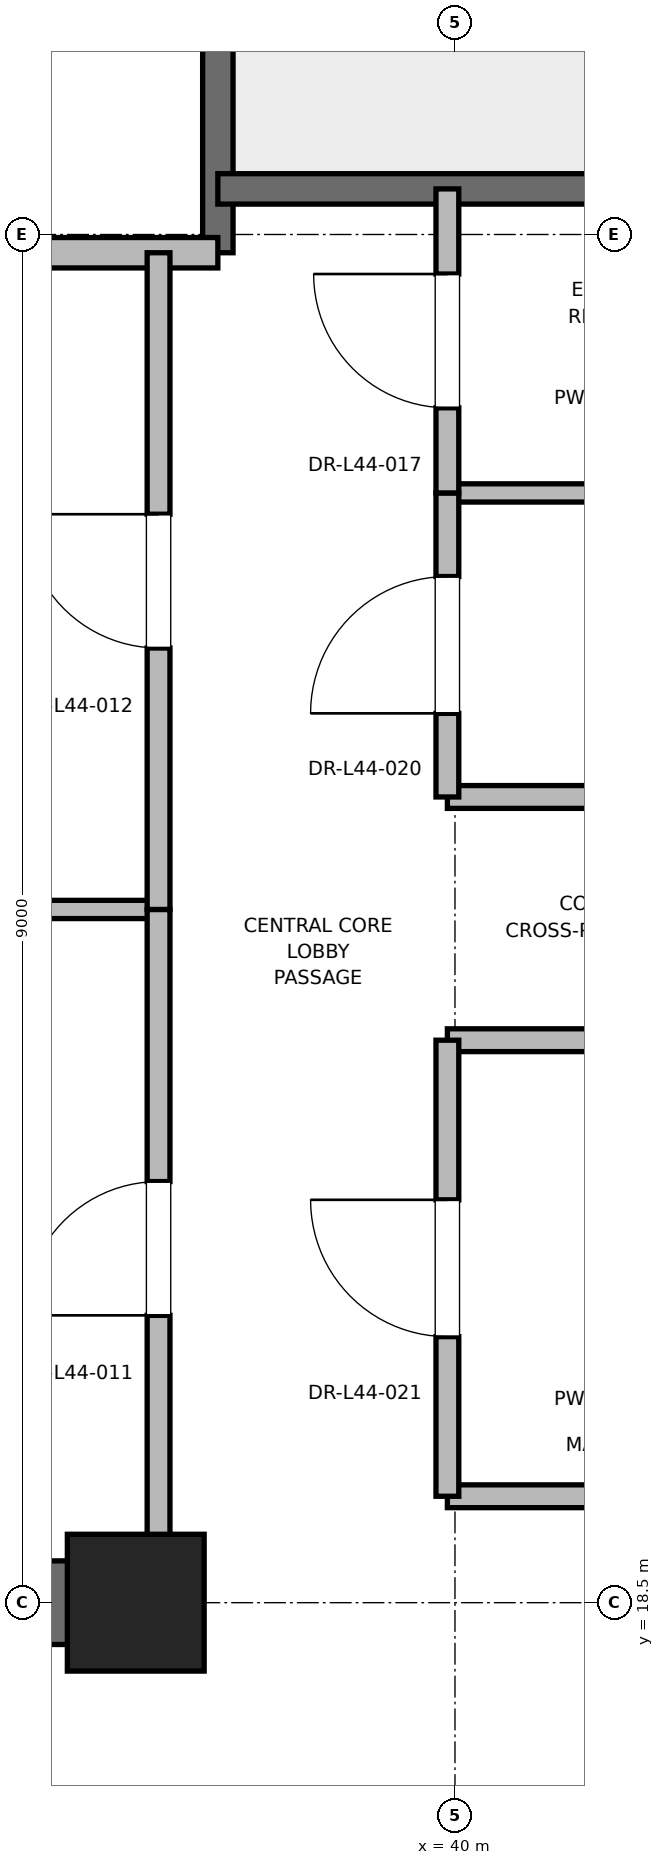
"""IFC4 building model, lengths in metres.
Left out: names, types, materials, properties, quantities, classifications, styles, units other than length and angle.
Written with IfcOpenShell. Run it as: python <this file> out.ifc"""

import sys

from ifc_helpers import new_model, si_unit, direction, frame, frame_2d, origin, origin_2d, place, context, subcontext, project, spatial, rectangle, extrude, element, fill, save


model = new_model("IFC4")
c1 = context("Model", 3, precision=1e-05, world=origin(), true_north=direction((0.0, 1.0)))
c2 = subcontext(c1, "Body", "Model", "MODEL_VIEW")
j1 = project(units=[si_unit("LENGTHUNIT", "METRE"), si_unit("PLANEANGLEUNIT", "RADIAN")], contexts=[c1])
p1 = place(None, origin())
s1 = spatial("IfcSite", under=j1, at=p1, CompositionType="ELEMENT")
p2 = place(p1, origin())
s2 = spatial("IfcBuilding", under=s1, at=p2, CompositionType="ELEMENT")
p3 = place(p2, frame((0.0, 0.0, 189.4)))
s3 = spatial("IfcBuildingStorey", under=s2, at=p3, CompositionType="ELEMENT", Elevation=189.4)
p4 = place(p3, frame((37.9, 18.5, 0.0), z_axis=(0.0, 0.0, 1.0), x_axis=(1.0, 0.0, 0.0)))
e1 = element("IfcColumn", 1, at=p4, inside=s3, PredefinedType="PILASTER", context=c2, shape_type="SweptSolid", body=[
    extrude(rectangle(XDim=0.9, YDim=0.9, at=origin_2d()), origin(), (0.0, 0.0, 1.0), 5.4),
])
p5 = place(p3, frame((29.0, 18.5, 0.0), z_axis=(0.0, 0.0, 1.0), x_axis=(1.0, 0.0, 0.0)))
e2 = element("IfcWall", 2, at=p5, inside=s3, PredefinedType="SHEAR", context=c2, shape_type="SweptSolid", body=[
    extrude(rectangle(XDim=9.2, YDim=0.55, at=frame_2d((4.6, 0.0))), origin(), (0.0, 0.0, 1.0), 5.1),
])
p6 = place(p3, frame((38.44, 27.38, 0.0), z_axis=(0.0, 0.0, 1.0), x_axis=(0.0, 1.0, 0.0)))
e3 = element("IfcWall", 3, at=p6, inside=s3, PredefinedType="SOLIDWALL", context=c2, shape_type="SweptSolid", body=[
    extrude(rectangle(XDim=8.87, YDim=0.2, at=frame_2d((4.435, 0.0))), origin(), (0.0, 0.0, 1.0), 5.1),
])
p7 = place(p3, frame((38.44, 27.8, 0.0), z_axis=(0.0, 0.0, 1.0), x_axis=(1.0, 0.0, 0.0)))
e4 = element("IfcWall", 4, at=p7, inside=s3, PredefinedType="SOLIDWALL", context=c2, shape_type="SweptSolid", body=[
    extrude(rectangle(XDim=3.32, YDim=0.2, at=frame_2d((1.66, 0.0))), origin(), (0.0, 0.0, 1.0), 5.1),
])
p8 = place(p3, frame((32.82, 27.38, 0.0), z_axis=(0.0, 0.0, 1.0), x_axis=(1.0, 0.0, 0.0)))
e5 = element("IfcWall", 5, at=p8, inside=s3, PredefinedType="PARTITIONING", context=c2, shape_type="SweptSolid", body=[
    extrude(rectangle(XDim=5.62, YDim=0.2, at=frame_2d((2.81, 0.0))), origin(), (0.0, 0.0, 1.0), 5.1),
])
for number, where, z_axis, x_axis in (
    (6, (39.95, 19.2, 0.0), (0.0, 0.0, 1.0), (1.0, 0.0, 0.0)),
    (7, (39.95, 22.2, 0.0), (0.0, 0.0, 1.0), (1.0, 0.0, 0.0)),
    (8, (39.95, 23.8, 0.0), (0.0, 0.0, 1.0), (1.0, 0.0, 0.0)),
):
    element("IfcWall", number, at=place(p3, frame(where, z_axis=z_axis, x_axis=x_axis)), inside=s3, PredefinedType="PARTITIONING", context=c2, shape_type="SweptSolid", body=[
        extrude(rectangle(XDim=1.81, YDim=0.15, at=frame_2d((0.905, 0.0))), origin(), (0.0, 0.0, 1.0), 2.85),
    ])
p9 = place(p3, frame((39.95, 25.8, 0.0), z_axis=(0.0, 0.0, 1.0), x_axis=(1.0, 0.0, 0.0)))
e9 = element("IfcWall", 9, at=p9, inside=s3, PredefinedType="PARTITIONING", context=c2, shape_type="SweptSolid", body=[
    extrude(rectangle(XDim=1.81, YDim=0.12, at=frame_2d((0.905, 0.0))), origin(), (0.0, 0.0, 1.0), 2.85),
])
p10 = place(p3, frame((39.95, 19.2, 0.0), z_axis=(0.0, 0.0, 1.0), x_axis=(0.0, 1.0, 0.0)))
e10 = element("IfcWall", 10, at=p10, inside=s3, PredefinedType="PARTITIONING", context=c2, shape_type="SweptSolid", body=[
    extrude(rectangle(XDim=3.0, YDim=0.15, at=frame_2d((1.5, 0.0))), origin(), (0.0, 0.0, 1.0), 2.85),
])
p11 = place(p10, frame((1.05, 0.0, 0.0)))
e11 = element("IfcOpeningElement", 11, at=p11, cuts=e10, PredefinedType="OPENING", context=c2, shape_type="SweptSolid", body=[
    extrude(rectangle(XDim=0.9, YDim=2.1, at=frame_2d((0.45, 1.05))), frame((0.0, 0.075, 0.0), z_axis=(0.0, -1.0, 0.0), x_axis=(1.0, 0.0, 0.0)), (0.0, 0.0, 1.0), 0.15),
])
p12 = place(p3, frame((39.95, 23.8, 0.0), z_axis=(0.0, 0.0, 1.0), x_axis=(0.0, 1.0, 0.0)))
e12 = element("IfcWall", 12, at=p12, inside=s3, PredefinedType="PARTITIONING", context=c2, shape_type="SweptSolid", body=[
    extrude(rectangle(XDim=2.0, YDim=0.15, at=frame_2d((1.0, 0.0))), origin(), (0.0, 0.0, 1.0), 2.85),
])
p13 = place(p12, frame((0.55, 0.0, 0.0)))
e13 = element("IfcOpeningElement", 13, at=p13, cuts=e12, PredefinedType="OPENING", context=c2, shape_type="SweptSolid", body=[
    extrude(rectangle(XDim=0.9, YDim=2.1, at=frame_2d((0.45, 1.05))), frame((0.0, 0.075, 0.0), z_axis=(0.0, -1.0, 0.0), x_axis=(1.0, 0.0, 0.0)), (0.0, 0.0, 1.0), 0.15),
])
p14 = place(p3, frame((39.95, 25.8, 0.0), z_axis=(0.0, 0.0, 1.0), x_axis=(0.0, 1.0, 0.0)))
e14 = element("IfcWall", 14, at=p14, inside=s3, PredefinedType="PARTITIONING", context=c2, shape_type="SweptSolid", body=[
    extrude(rectangle(XDim=2.0, YDim=0.15, at=frame_2d((1.0, 0.0))), origin(), (0.0, 0.0, 1.0), 2.85),
])
p15 = place(p14, frame((0.56, 0.0, 0.0)))
e15 = element("IfcOpeningElement", 15, at=p15, cuts=e14, PredefinedType="OPENING", context=c2, shape_type="SweptSolid", body=[
    extrude(rectangle(XDim=0.88, YDim=2.1, at=frame_2d((0.44, 1.05))), frame((0.0, 0.075, 0.0), z_axis=(0.0, -1.0, 0.0), x_axis=(1.0, 0.0, 0.0)), (0.0, 0.0, 1.0), 0.15),
])
p16 = place(p3, frame((32.82, 23.06, 0.0), z_axis=(0.0, 0.0, 1.0), x_axis=(1.0, 0.0, 0.0)))
e16 = element("IfcWall", 16, at=p16, inside=s3, PredefinedType="PARTITIONING", context=c2, shape_type="SweptSolid", body=[
    extrude(rectangle(XDim=5.23, YDim=0.12, at=frame_2d((2.615, 0.0))), origin(), (0.0, 0.0, 1.0), 2.85),
])
p17 = place(p3, frame((38.05, 18.6, 0.0), z_axis=(0.0, 0.0, 1.0), x_axis=(0.0, 1.0, 0.0)))
e17 = element("IfcWall", 17, at=p17, inside=s3, PredefinedType="PARTITIONING", context=c2, shape_type="SweptSolid", body=[
    extrude(rectangle(XDim=4.46, YDim=0.15, at=frame_2d((2.23, 0.0))), origin(), (0.0, 0.0, 1.0), 2.85),
])
p18 = place(p17, frame((1.79, 0.0, 0.0)))
e18 = element("IfcOpeningElement", 18, at=p18, cuts=e17, PredefinedType="OPENING", context=c2, shape_type="SweptSolid", body=[
    extrude(rectangle(XDim=0.88, YDim=2.1, at=frame_2d((0.44, 1.05))), frame((0.0, 0.075, 0.0), z_axis=(0.0, -1.0, 0.0), x_axis=(1.0, 0.0, 0.0)), (0.0, 0.0, 1.0), 0.15),
])
p19 = place(p3, frame((38.05, 23.06, 0.0), z_axis=(0.0, 0.0, 1.0), x_axis=(0.0, 1.0, 0.0)))
e19 = element("IfcWall", 19, at=p19, inside=s3, PredefinedType="PARTITIONING", context=c2, shape_type="SweptSolid", body=[
    extrude(rectangle(XDim=4.32, YDim=0.15, at=frame_2d((2.16, 0.0))), origin(), (0.0, 0.0, 1.0), 2.85),
])
p20 = place(p19, frame((1.72, 0.0, 0.0)))
e20 = element("IfcOpeningElement", 20, at=p20, cuts=e19, PredefinedType="OPENING", context=c2, shape_type="SweptSolid", body=[
    extrude(rectangle(XDim=0.88, YDim=2.1, at=frame_2d((0.44, 1.05))), frame((0.0, 0.075, 0.0), z_axis=(0.0, -1.0, 0.0), x_axis=(1.0, 0.0, 0.0)), (0.0, 0.0, 1.0), 0.15),
])
p21 = place(p11, origin())
e21 = element("IfcDoor", 21, at=p21, inside=s3, OperationType="SINGLE_SWING_RIGHT", PredefinedType="DOOR", context=c2, shape_type="SweptSolid", body=[
    extrude(rectangle(XDim=0.9, YDim=2.1, at=frame_2d((0.45, 1.05))), frame((0.0, 0.025, 0.0), z_axis=(0.0, -1.0, 0.0), x_axis=(1.0, 0.0, 0.0)), (0.0, 0.0, 1.0), 0.05),
])
fill(e11, e21)
p22 = place(p13, origin())
e22 = element("IfcDoor", 22, at=p22, inside=s3, OperationType="SINGLE_SWING_LEFT", PredefinedType="DOOR", context=c2, shape_type="SweptSolid", body=[
    extrude(rectangle(XDim=0.9, YDim=2.1, at=frame_2d((0.45, 1.05))), frame((0.0, 0.025, 0.0), z_axis=(0.0, -1.0, 0.0), x_axis=(1.0, 0.0, 0.0)), (0.0, 0.0, 1.0), 0.05),
])
fill(e13, e22)
p23 = place(p15, origin())
e23 = element("IfcDoor", 23, at=p23, inside=s3, OperationType="SINGLE_SWING_RIGHT", PredefinedType="DOOR", context=c2, shape_type="SweptSolid", body=[
    extrude(rectangle(XDim=0.88, YDim=2.1, at=frame_2d((0.44, 1.05))), frame((0.0, 0.025, 0.0), z_axis=(0.0, -1.0, 0.0), x_axis=(1.0, 0.0, 0.0)), (0.0, 0.0, 1.0), 0.05),
])
fill(e15, e23)
p24 = place(p18, origin())
e24 = element("IfcDoor", 24, at=p24, inside=s3, OperationType="SINGLE_SWING_LEFT", PredefinedType="DOOR", context=c2, shape_type="SweptSolid", body=[
    extrude(rectangle(XDim=0.88, YDim=2.1, at=frame_2d((0.44, 1.05))), frame((0.0, 0.025, 0.0), z_axis=(0.0, -1.0, 0.0), x_axis=(1.0, 0.0, 0.0)), (0.0, 0.0, 1.0), 0.05),
])
fill(e18, e24)
p25 = place(p20, origin())
e25 = element("IfcDoor", 25, at=p25, inside=s3, OperationType="SINGLE_SWING_RIGHT", PredefinedType="DOOR", context=c2, shape_type="SweptSolid", body=[
    extrude(rectangle(XDim=0.88, YDim=2.1, at=frame_2d((0.44, 1.05))), frame((0.0, 0.025, 0.0), z_axis=(0.0, -1.0, 0.0), x_axis=(1.0, 0.0, 0.0)), (0.0, 0.0, 1.0), 0.05),
])
fill(e20, e25)
save(model, sys.argv[1])
